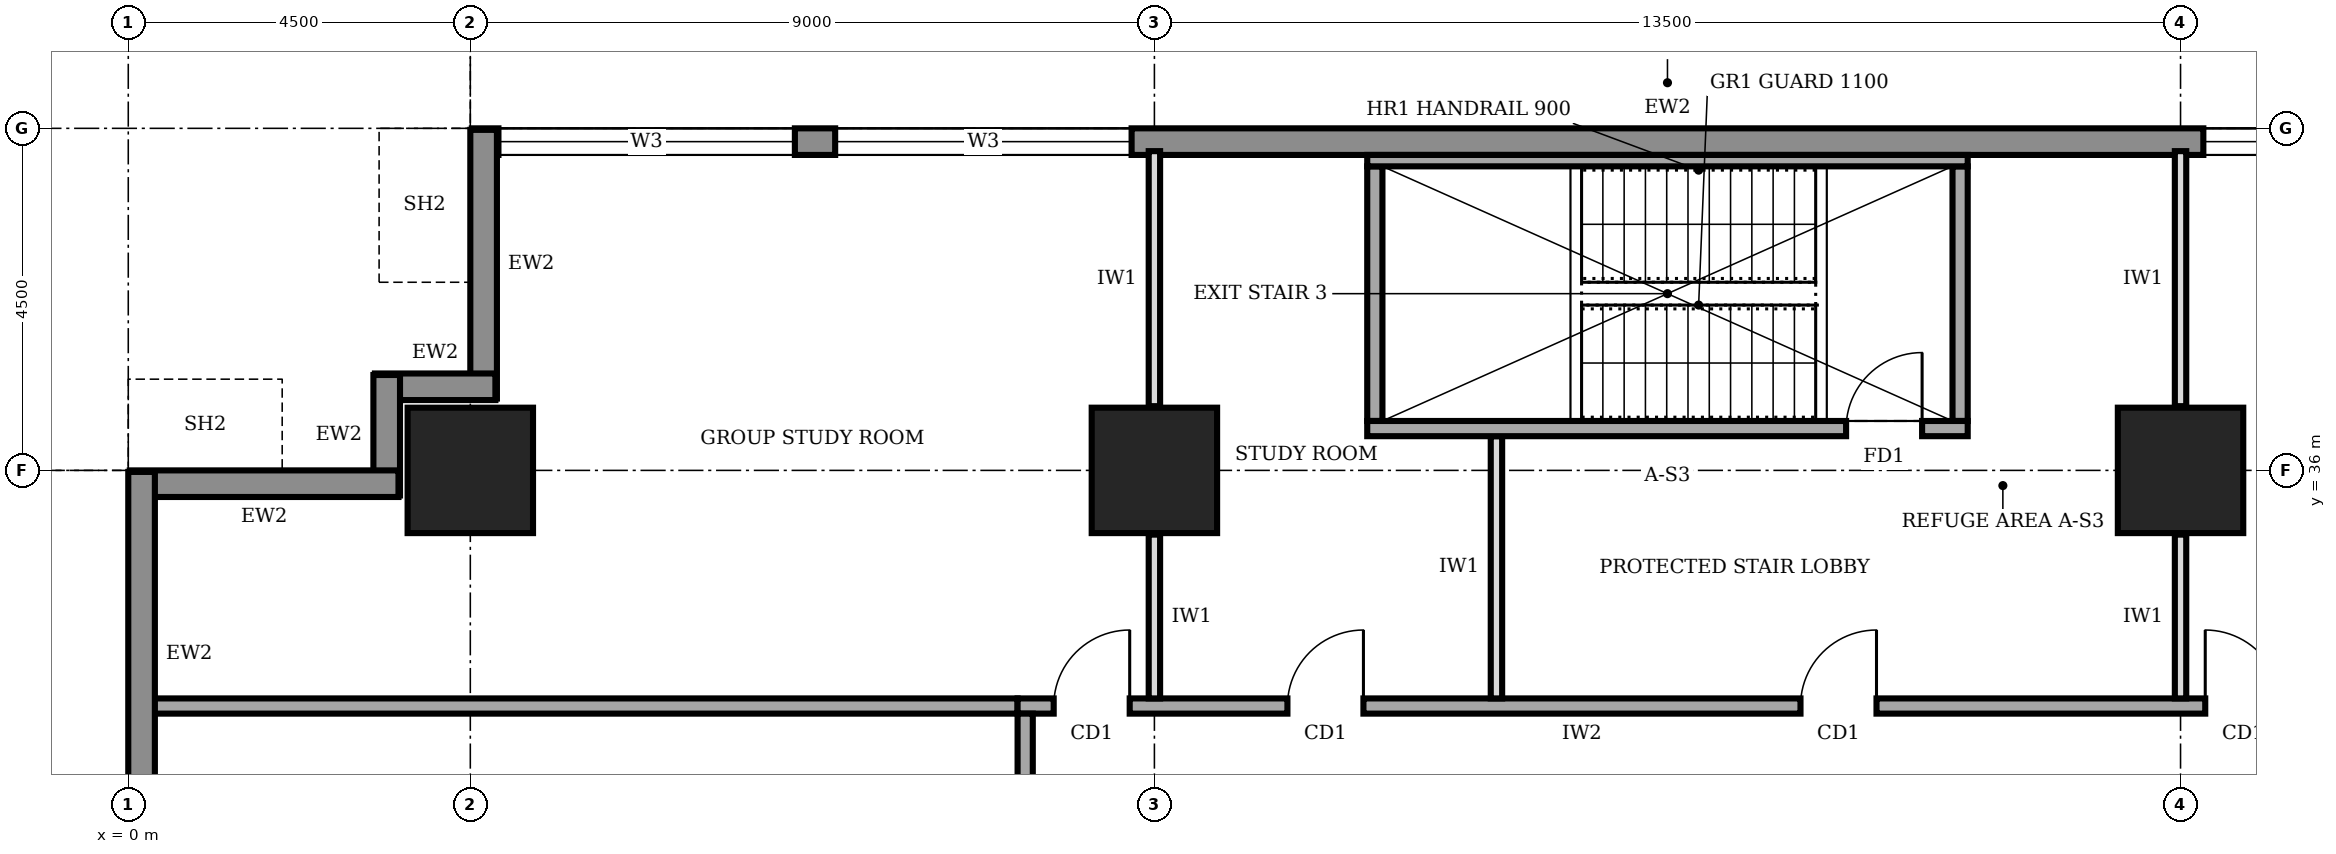
"""IFC4 building model, lengths in metres.
Left out: names, types, materials, properties, quantities, classifications, styles, units other than length and angle.
Written with IfcOpenShell. Run it as: python <this file> out.ifc"""

import sys

from ifc_helpers import new_model, si_unit, direction, frame, frame_2d, origin, origin_2d, place, context, subcontext, project, spatial, rectangle, extrude, element, fill, save


model = new_model("IFC4")
c1 = context("Model", 3, precision=1e-05, world=origin(), true_north=direction((0.0, 1.0)))
c2 = subcontext(c1, "Body", "Model", "MODEL_VIEW")
j1 = project(units=[si_unit("LENGTHUNIT", "METRE"), si_unit("PLANEANGLEUNIT", "RADIAN")], contexts=[c1])
p1 = place(None, origin())
s1 = spatial("IfcSite", under=j1, at=p1, CompositionType="ELEMENT")
p2 = place(p1, origin())
s2 = spatial("IfcBuilding", under=s1, at=p2, CompositionType="ELEMENT")
p3 = place(p2, frame((0.0, 0.0, 193.0)))
s3 = spatial("IfcBuildingStorey", under=s2, at=p3, CompositionType="ELEMENT", Elevation=193.0)
for number, where, z_axis, x_axis in (
    (1, (4.5, 36.0, 0.0), (0.0, 0.0, 1.0), (1.0, 0.0, 0.0)),
    (2, (13.5, 36.0, 0.0), (0.0, 0.0, 1.0), (1.0, 0.0, 0.0)),
    (3, (27.0, 36.0, 0.0), (0.0, 0.0, 1.0), (1.0, 0.0, 0.0)),
):
    element("IfcColumn", number, at=place(p3, frame(where, z_axis=z_axis, x_axis=x_axis)), inside=s3, PredefinedType="COLUMN", context=c2, shape_type="SweptSolid", body=[
        extrude(rectangle(XDim=1.65, YDim=1.65, at=origin_2d()), origin(), (0.0, 0.0, 1.0), 4.0),
    ])
p4 = place(p3, frame((35.98, 40.325, 0.0), z_axis=(0.0, 0.0, 1.0), x_axis=(-1.0, 0.0, 0.0)))
e4 = element("IfcWall", 4, at=p4, inside=s3, PredefinedType="STANDARD", context=c2, shape_type="SweptSolid", body=[
    extrude(rectangle(XDim=31.46, YDim=0.35, at=frame_2d((15.73, 0.0))), origin(), (0.0, 0.0, 1.0), 3.75),
])
p5 = place(p4, frame((27.21, 0.0, 0.95)))
e5 = element("IfcOpeningElement", 5, at=p5, cuts=e4, PredefinedType="OPENING", context=c2, shape_type="SweptSolid", body=[
    extrude(rectangle(XDim=3.9, YDim=1.8, at=frame_2d((1.95, 0.9))), frame((0.0, 0.185, 0.0), z_axis=(0.0, -1.0, 0.0), x_axis=(1.0, 0.0, 0.0)), (0.0, 0.0, 1.0), 0.37),
])
p6 = place(p4, frame((22.78, 0.0, 0.95)))
e6 = element("IfcOpeningElement", 6, at=p6, cuts=e4, PredefinedType="OPENING", context=c2, shape_type="SweptSolid", body=[
    extrude(rectangle(XDim=3.9, YDim=1.8, at=frame_2d((1.95, 0.9))), frame((0.0, 0.185, 0.0), z_axis=(0.0, -1.0, 0.0), x_axis=(1.0, 0.0, 0.0)), (0.0, 0.0, 1.0), 0.37),
])
p7 = place(p4, frame((4.78, 0.0, 0.95)))
e7 = element("IfcOpeningElement", 7, at=p7, cuts=e4, PredefinedType="OPENING", context=c2, shape_type="SweptSolid", body=[
    extrude(rectangle(XDim=3.9, YDim=1.8, at=frame_2d((1.95, 0.9))), frame((0.0, 0.185, 0.0), z_axis=(0.0, -1.0, 0.0), x_axis=(1.0, 0.0, 0.0)), (0.0, 0.0, 1.0), 0.37),
])
p8 = place(p3, frame((4.675, 40.48, 0.0), z_axis=(0.0, 0.0, 1.0), x_axis=(0.0, -1.0, 0.0)))
e8 = element("IfcWall", 8, at=p8, inside=s3, PredefinedType="STANDARD", context=c2, shape_type="SweptSolid", body=[
    extrude(rectangle(XDim=3.535, YDim=0.35, at=frame_2d((1.768, 0.0))), origin(), (0.0, 0.0, 1.0), 2.85),
])
for number, where, z_axis, x_axis in (
    (9, (4.83, 37.1, 0.0), (0.0, 0.0, 1.0), (-1.0, 0.0, 0.0)),
    (10, (3.4, 37.255, 0.0), (0.0, 0.0, 1.0), (0.0, -1.0, 0.0)),
):
    element("IfcWall", number, at=place(p3, frame(where, z_axis=z_axis, x_axis=x_axis)), inside=s3, PredefinedType="STANDARD", context=c2, shape_type="SweptSolid", body=[
        extrude(rectangle(XDim=1.585, YDim=0.35, at=frame_2d((0.792, 0.0))), origin(), (0.0, 0.0, 1.0), 3.75),
    ])
p9 = place(p3, frame((3.555, 35.825, 0.0), z_axis=(0.0, 0.0, 1.0), x_axis=(-1.0, 0.0, 0.0)))
e11 = element("IfcWall", 11, at=p9, inside=s3, PredefinedType="STANDARD", context=c2, shape_type="SweptSolid", body=[
    extrude(rectangle(XDim=3.535, YDim=0.35, at=frame_2d((1.768, 0.0))), origin(), (0.0, 0.0, 1.0), 2.85),
])
p10 = place(p3, frame((0.175, 35.98, 0.0), z_axis=(0.0, 0.0, 1.0), x_axis=(0.0, -1.0, 0.0)))
e12 = element("IfcWall", 12, at=p10, inside=s3, PredefinedType="STANDARD", context=c2, shape_type="SweptSolid", body=[
    extrude(rectangle(XDim=31.46, YDim=0.35, at=frame_2d((15.73, 0.0))), origin(), (0.0, 0.0, 1.0), 3.75),
])
p11 = place(p10, frame((27.21, 0.0, 0.95)))
e13 = element("IfcOpeningElement", 13, at=p11, cuts=e12, PredefinedType="OPENING", context=c2, shape_type="SweptSolid", body=[
    extrude(rectangle(XDim=3.9, YDim=1.8, at=frame_2d((1.95, 0.9))), frame((0.0, 0.185, 0.0), z_axis=(0.0, -1.0, 0.0), x_axis=(1.0, 0.0, 0.0)), (0.0, 0.0, 1.0), 0.37),
])
p12 = place(p10, frame((22.78, 0.0, 0.95)))
e14 = element("IfcOpeningElement", 14, at=p12, cuts=e12, PredefinedType="OPENING", context=c2, shape_type="SweptSolid", body=[
    extrude(rectangle(XDim=3.9, YDim=1.8, at=frame_2d((1.95, 0.9))), frame((0.0, 0.185, 0.0), z_axis=(0.0, -1.0, 0.0), x_axis=(1.0, 0.0, 0.0)), (0.0, 0.0, 1.0), 0.37),
])
p13 = place(p10, frame((18.28, 0.0, 0.95)))
e15 = element("IfcOpeningElement", 15, at=p13, cuts=e12, PredefinedType="OPENING", context=c2, shape_type="SweptSolid", body=[
    extrude(rectangle(XDim=3.9, YDim=1.8, at=frame_2d((1.95, 0.9))), frame((0.0, 0.185, 0.0), z_axis=(0.0, -1.0, 0.0), x_axis=(1.0, 0.0, 0.0)), (0.0, 0.0, 1.0), 0.37),
])
p14 = place(p10, frame((13.78, 0.0, 0.95)))
e16 = element("IfcOpeningElement", 16, at=p14, cuts=e12, PredefinedType="OPENING", context=c2, shape_type="SweptSolid", body=[
    extrude(rectangle(XDim=3.9, YDim=1.8, at=frame_2d((1.95, 0.9))), frame((0.0, 0.185, 0.0), z_axis=(0.0, -1.0, 0.0), x_axis=(1.0, 0.0, 0.0)), (0.0, 0.0, 1.0), 0.37),
])
p15 = place(p10, frame((9.28, 0.0, 0.95)))
e17 = element("IfcOpeningElement", 17, at=p15, cuts=e12, PredefinedType="OPENING", context=c2, shape_type="SweptSolid", body=[
    extrude(rectangle(XDim=3.9, YDim=1.8, at=frame_2d((1.95, 0.9))), frame((0.0, 0.185, 0.0), z_axis=(0.0, -1.0, 0.0), x_axis=(1.0, 0.0, 0.0)), (0.0, 0.0, 1.0), 0.37),
])
p16 = place(p10, frame((4.78, 0.0, 0.95)))
e18 = element("IfcOpeningElement", 18, at=p16, cuts=e12, PredefinedType="OPENING", context=c2, shape_type="SweptSolid", body=[
    extrude(rectangle(XDim=3.9, YDim=1.8, at=frame_2d((1.95, 0.9))), frame((0.0, 0.185, 0.0), z_axis=(0.0, -1.0, 0.0), x_axis=(1.0, 0.0, 0.0)), (0.0, 0.0, 1.0), 0.37),
])
p17 = place(p3, frame((28.6, 32.9, 0.0), z_axis=(0.0, 0.0, 1.0), x_axis=(-1.0, 0.0, 0.0)))
e19 = element("IfcWall", 19, at=p17, inside=s3, PredefinedType="SOLIDWALL", context=c2, shape_type="SweptSolid", body=[
    extrude(rectangle(XDim=16.9, YDim=0.2, at=frame_2d((8.45, 0.0))), origin(), (0.0, 0.0, 1.0), 3.75),
])
p18 = place(p17, frame((15.425, 0.0, 0.0)))
e20 = element("IfcOpeningElement", 20, at=p18, cuts=e19, PredefinedType="OPENING", context=c2, shape_type="SweptSolid", body=[
    extrude(rectangle(XDim=1.0, YDim=2.1, at=frame_2d((0.5, 1.05))), frame((0.0, 0.11, 0.0), z_axis=(0.0, -1.0, 0.0), x_axis=(1.0, 0.0, 0.0)), (0.0, 0.0, 1.0), 0.22),
])
p19 = place(p17, frame((12.35, 0.0, 0.0)))
e21 = element("IfcOpeningElement", 21, at=p19, cuts=e19, PredefinedType="OPENING", context=c2, shape_type="SweptSolid", body=[
    extrude(rectangle(XDim=1.0, YDim=2.1, at=frame_2d((0.5, 1.05))), frame((0.0, 0.11, 0.0), z_axis=(0.0, -1.0, 0.0), x_axis=(1.0, 0.0, 0.0)), (0.0, 0.0, 1.0), 0.22),
])
p20 = place(p17, frame((5.6, 0.0, 0.0)))
e22 = element("IfcOpeningElement", 22, at=p20, cuts=e19, PredefinedType="OPENING", context=c2, shape_type="SweptSolid", body=[
    extrude(rectangle(XDim=1.0, YDim=2.1, at=frame_2d((0.5, 1.05))), frame((0.0, 0.11, 0.0), z_axis=(0.0, -1.0, 0.0), x_axis=(1.0, 0.0, 0.0)), (0.0, 0.0, 1.0), 0.22),
])
p21 = place(p17, frame((0.275, 0.0, 0.0)))
e23 = element("IfcOpeningElement", 23, at=p21, cuts=e19, PredefinedType="OPENING", context=c2, shape_type="SweptSolid", body=[
    extrude(rectangle(XDim=1.0, YDim=2.1, at=frame_2d((0.5, 1.05))), frame((0.0, 0.11, 0.0), z_axis=(0.0, -1.0, 0.0), x_axis=(1.0, 0.0, 0.0)), (0.0, 0.0, 1.0), 0.22),
])
p22 = place(p3, frame((11.8, 32.8, 0.0), z_axis=(0.0, 0.0, 1.0), x_axis=(0.0, -1.0, 0.0)))
e24 = element("IfcWall", 24, at=p22, inside=s3, PredefinedType="SOLIDWALL", context=c2, shape_type="SweptSolid", body=[
    extrude(rectangle(XDim=25.3, YDim=0.2, at=frame_2d((12.65, 0.0))), origin(), (0.0, 0.0, 1.0), 3.75),
])
p23 = place(p22, frame((21.8, 0.0, 0.0)))
e25 = element("IfcOpeningElement", 25, at=p23, cuts=e24, PredefinedType="OPENING", context=c2, shape_type="SweptSolid", body=[
    extrude(rectangle(XDim=1.0, YDim=2.1, at=frame_2d((0.5, 1.05))), frame((0.0, 0.11, 0.0), z_axis=(0.0, -1.0, 0.0), x_axis=(1.0, 0.0, 0.0)), (0.0, 0.0, 1.0), 0.22),
])
p24 = place(p22, frame((17.7, 0.0, 0.0)))
e26 = element("IfcOpeningElement", 26, at=p24, cuts=e24, PredefinedType="OPENING", context=c2, shape_type="SweptSolid", body=[
    extrude(rectangle(XDim=1.0, YDim=2.1, at=frame_2d((0.5, 1.05))), frame((0.0, 0.11, 0.0), z_axis=(0.0, -1.0, 0.0), x_axis=(1.0, 0.0, 0.0)), (0.0, 0.0, 1.0), 0.22),
])
p25 = place(p22, frame((14.7, 0.0, 0.0)))
e27 = element("IfcOpeningElement", 27, at=p25, cuts=e24, PredefinedType="OPENING", context=c2, shape_type="SweptSolid", body=[
    extrude(rectangle(XDim=0.9, YDim=2.1, at=frame_2d((0.45, 1.05))), frame((0.0, 0.11, 0.0), z_axis=(0.0, -1.0, 0.0), x_axis=(1.0, 0.0, 0.0)), (0.0, 0.0, 1.0), 0.22),
])
p26 = place(p22, frame((11.65, 0.0, 0.0)))
e28 = element("IfcOpeningElement", 28, at=p26, cuts=e24, PredefinedType="OPENING", context=c2, shape_type="SweptSolid", body=[
    extrude(rectangle(XDim=0.9, YDim=2.1, at=frame_2d((0.45, 1.05))), frame((0.0, 0.11, 0.0), z_axis=(0.0, -1.0, 0.0), x_axis=(1.0, 0.0, 0.0)), (0.0, 0.0, 1.0), 0.22),
])
p27 = place(p22, frame((6.95, 0.0, 0.0)))
e29 = element("IfcOpeningElement", 29, at=p27, cuts=e24, PredefinedType="OPENING", context=c2, shape_type="SweptSolid", body=[
    extrude(rectangle(XDim=0.9, YDim=2.1, at=frame_2d((0.45, 1.05))), frame((0.0, 0.11, 0.0), z_axis=(0.0, -1.0, 0.0), x_axis=(1.0, 0.0, 0.0)), (0.0, 0.0, 1.0), 0.22),
])
p28 = place(p22, frame((9.5, 0.0, 0.0)))
e30 = element("IfcOpeningElement", 30, at=p28, cuts=e24, PredefinedType="OPENING", context=c2, shape_type="SweptSolid", body=[
    extrude(rectangle(XDim=1.0, YDim=2.1, at=frame_2d((0.5, 1.05))), frame((0.0, 0.11, 0.0), z_axis=(0.0, -1.0, 0.0), x_axis=(1.0, 0.0, 0.0)), (0.0, 0.0, 1.0), 0.22),
])
p29 = place(p22, frame((2.3, 0.0, 0.0)))
e31 = element("IfcOpeningElement", 31, at=p29, cuts=e24, PredefinedType="OPENING", context=c2, shape_type="SweptSolid", body=[
    extrude(rectangle(XDim=1.0, YDim=2.1, at=frame_2d((0.5, 1.05))), frame((0.0, 0.11, 0.0), z_axis=(0.0, -1.0, 0.0), x_axis=(1.0, 0.0, 0.0)), (0.0, 0.0, 1.0), 0.22),
])
p30 = place(p3, frame((0.3, 32.9, 0.0), z_axis=(0.0, 0.0, 1.0), x_axis=(1.0, 0.0, 0.0)))
e32 = element("IfcWall", 32, at=p30, inside=s3, PredefinedType="SOLIDWALL", context=c2, shape_type="SweptSolid", body=[
    extrude(rectangle(XDim=11.4, YDim=0.2, at=frame_2d((5.7, 0.0))), origin(), (0.0, 0.0, 1.0), 3.75),
])
p31 = place(p3, frame((13.5, 33.0, 0.0), z_axis=(0.0, 0.0, 1.0), x_axis=(0.0, 1.0, 0.0)))
e33 = element("IfcWall", 33, at=p31, inside=s3, PredefinedType="PARTITIONING", context=c2, shape_type="SweptSolid", body=[
    extrude(rectangle(XDim=2.155, YDim=0.15, at=frame_2d((1.078, 0.0))), origin(), (0.0, 0.0, 1.0), 2.85),
])
p32 = place(p3, frame((13.5, 36.845, 0.0), z_axis=(0.0, 0.0, 1.0), x_axis=(0.0, 1.0, 0.0)))
e34 = element("IfcWall", 34, at=p32, inside=s3, PredefinedType="PARTITIONING", context=c2, shape_type="SweptSolid", body=[
    extrude(rectangle(XDim=3.355, YDim=0.15, at=frame_2d((1.677, 0.0))), origin(), (0.0, 0.0, 1.0), 2.85),
])
p33 = place(p3, frame((18.0, 33.0, 0.0), z_axis=(0.0, 0.0, 1.0), x_axis=(0.0, 1.0, 0.0)))
e35 = element("IfcWall", 35, at=p33, inside=s3, PredefinedType="PARTITIONING", context=c2, shape_type="SweptSolid", body=[
    extrude(rectangle(XDim=3.45, YDim=0.15, at=frame_2d((1.725, 0.0))), origin(), (0.0, 0.0, 1.0), 3.75),
])
p34 = place(p3, frame((27.0, 33.0, 0.0), z_axis=(0.0, 0.0, 1.0), x_axis=(0.0, 1.0, 0.0)))
e36 = element("IfcWall", 36, at=p34, inside=s3, PredefinedType="PARTITIONING", context=c2, shape_type="SweptSolid", body=[
    extrude(rectangle(XDim=2.155, YDim=0.15, at=frame_2d((1.078, 0.0))), origin(), (0.0, 0.0, 1.0), 2.85),
])
p35 = place(p3, frame((27.0, 36.845, 0.0), z_axis=(0.0, 0.0, 1.0), x_axis=(0.0, 1.0, 0.0)))
e37 = element("IfcWall", 37, at=p35, inside=s3, PredefinedType="PARTITIONING", context=c2, shape_type="SweptSolid", body=[
    extrude(rectangle(XDim=3.355, YDim=0.15, at=frame_2d((1.677, 0.0))), origin(), (0.0, 0.0, 1.0), 2.85),
])
p36 = place(p3, frame((16.3, 36.55, 0.0), z_axis=(0.0, 0.0, 1.0), x_axis=(1.0, 0.0, 0.0)))
e38 = element("IfcWall", 38, at=p36, inside=s3, PredefinedType="SOLIDWALL", context=c2, shape_type="SweptSolid", body=[
    extrude(rectangle(XDim=7.9, YDim=0.2, at=frame_2d((3.95, 0.0))), origin(), (0.0, 0.0, 1.0), 3.75),
])
p37 = place(p36, frame((6.3, 0.0, 0.0)))
e39 = element("IfcOpeningElement", 39, at=p37, cuts=e38, PredefinedType="OPENING", context=c2, shape_type="SweptSolid", body=[
    extrude(rectangle(XDim=1.0, YDim=2.1, at=frame_2d((0.5, 1.05))), frame((0.0, 0.11, 0.0), z_axis=(0.0, -1.0, 0.0), x_axis=(1.0, 0.0, 0.0)), (0.0, 0.0, 1.0), 0.22),
])
p38 = place(p3, frame((16.3, 40.075, 0.0), z_axis=(0.0, 0.0, 1.0), x_axis=(1.0, 0.0, 0.0)))
e40 = element("IfcWall", 40, at=p38, inside=s3, PredefinedType="SOLIDWALL", context=c2, shape_type="SweptSolid", body=[
    extrude(rectangle(XDim=7.9, YDim=0.15, at=frame_2d((3.95, 0.0))), origin(), (0.0, 0.0, 1.0), 3.75),
])
for number, where, z_axis, x_axis in (
    (41, (16.4, 36.65, 0.0), (0.0, 0.0, 1.0), (0.0, 1.0, 0.0)),
    (42, (24.1, 36.65, 0.0), (0.0, 0.0, 1.0), (0.0, 1.0, 0.0)),
):
    element("IfcWall", number, at=place(p3, frame(where, z_axis=z_axis, x_axis=x_axis)), inside=s3, PredefinedType="SOLIDWALL", context=c2, shape_type="SweptSolid", body=[
        extrude(rectangle(XDim=3.35, YDim=0.2, at=frame_2d((1.675, 0.0))), origin(), (0.0, 0.0, 1.0), 3.75),
    ])
p39 = place(p5, origin())
e43 = element("IfcWindow", 43, at=p39, inside=s3, PartitioningType="SINGLE_PANEL", PredefinedType="WINDOW", context=c2, shape_type="SweptSolid", body=[
    extrude(rectangle(XDim=3.9, YDim=1.8, at=frame_2d((1.95, 0.9))), frame((0.0, 0.03, 0.0), z_axis=(0.0, -1.0, 0.0), x_axis=(1.0, 0.0, 0.0)), (0.0, 0.0, 1.0), 0.06),
])
fill(e5, e43)
p40 = place(p6, origin())
e44 = element("IfcWindow", 44, at=p40, inside=s3, PartitioningType="SINGLE_PANEL", PredefinedType="WINDOW", context=c2, shape_type="SweptSolid", body=[
    extrude(rectangle(XDim=3.9, YDim=1.8, at=frame_2d((1.95, 0.9))), frame((0.0, 0.03, 0.0), z_axis=(0.0, -1.0, 0.0), x_axis=(1.0, 0.0, 0.0)), (0.0, 0.0, 1.0), 0.06),
])
fill(e6, e44)
p41 = place(p7, origin())
e45 = element("IfcWindow", 45, at=p41, inside=s3, PartitioningType="SINGLE_PANEL", PredefinedType="WINDOW", context=c2, shape_type="SweptSolid", body=[
    extrude(rectangle(XDim=3.9, YDim=1.8, at=frame_2d((1.95, 0.9))), frame((0.0, 0.03, 0.0), z_axis=(0.0, -1.0, 0.0), x_axis=(1.0, 0.0, 0.0)), (0.0, 0.0, 1.0), 0.06),
])
fill(e7, e45)
p42 = place(p18, frame((1.0, 0.0, 0.0), z_axis=(0.0, 0.0, 1.0), x_axis=(-1.0, 0.0, 0.0)))
e46 = element("IfcDoor", 46, at=p42, inside=s3, OperationType="SINGLE_SWING_RIGHT", PredefinedType="DOOR", context=c2, shape_type="SweptSolid", body=[
    extrude(rectangle(XDim=1.0, YDim=2.1, at=frame_2d((0.5, 1.05))), frame((0.0, 0.025, 0.0), z_axis=(0.0, -1.0, 0.0), x_axis=(1.0, 0.0, 0.0)), (0.0, 0.0, 1.0), 0.05),
])
fill(e20, e46)
p43 = place(p19, frame((1.0, 0.0, 0.0), z_axis=(0.0, 0.0, 1.0), x_axis=(-1.0, 0.0, 0.0)))
e47 = element("IfcDoor", 47, at=p43, inside=s3, OperationType="SINGLE_SWING_RIGHT", PredefinedType="DOOR", context=c2, shape_type="SweptSolid", body=[
    extrude(rectangle(XDim=1.0, YDim=2.1, at=frame_2d((0.5, 1.05))), frame((0.0, 0.025, 0.0), z_axis=(0.0, -1.0, 0.0), x_axis=(1.0, 0.0, 0.0)), (0.0, 0.0, 1.0), 0.05),
])
fill(e21, e47)
p44 = place(p20, frame((1.0, 0.0, 0.0), z_axis=(0.0, 0.0, 1.0), x_axis=(-1.0, 0.0, 0.0)))
e48 = element("IfcDoor", 48, at=p44, inside=s3, OperationType="SINGLE_SWING_RIGHT", PredefinedType="DOOR", context=c2, shape_type="SweptSolid", body=[
    extrude(rectangle(XDim=1.0, YDim=2.1, at=frame_2d((0.5, 1.05))), frame((0.0, 0.025, 0.0), z_axis=(0.0, -1.0, 0.0), x_axis=(1.0, 0.0, 0.0)), (0.0, 0.0, 1.0), 0.05),
])
fill(e22, e48)
p45 = place(p21, frame((1.0, 0.0, 0.0), z_axis=(0.0, 0.0, 1.0), x_axis=(-1.0, 0.0, 0.0)))
e49 = element("IfcDoor", 49, at=p45, inside=s3, OperationType="SINGLE_SWING_LEFT", PredefinedType="DOOR", context=c2, shape_type="SweptSolid", body=[
    extrude(rectangle(XDim=1.0, YDim=2.1, at=frame_2d((0.5, 1.05))), frame((0.0, 0.025, 0.0), z_axis=(0.0, -1.0, 0.0), x_axis=(1.0, 0.0, 0.0)), (0.0, 0.0, 1.0), 0.05),
])
fill(e23, e49)
p46 = place(p37, origin())
e50 = element("IfcDoor", 50, at=p46, inside=s3, OperationType="SINGLE_SWING_RIGHT", PredefinedType="DOOR", context=c2, shape_type="SweptSolid", body=[
    extrude(rectangle(XDim=1.0, YDim=2.1, at=frame_2d((0.5, 1.05))), frame((0.0, 0.025, 0.0), z_axis=(0.0, -1.0, 0.0), x_axis=(1.0, 0.0, 0.0)), (0.0, 0.0, 1.0), 0.05),
])
fill(e39, e50)
save(model, sys.argv[1])
